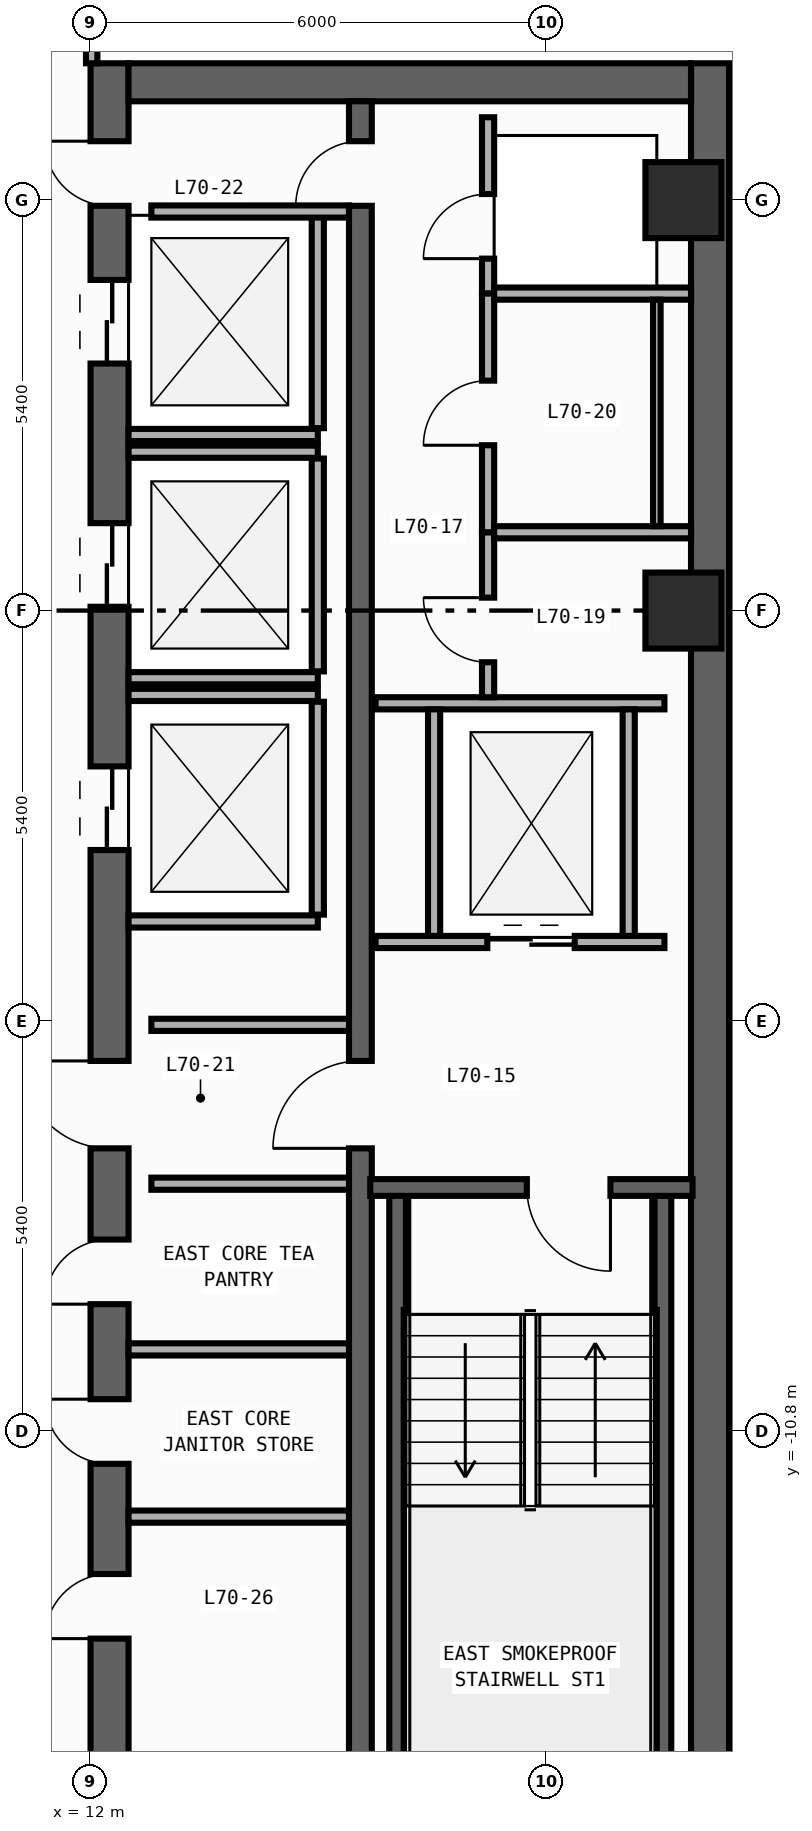
"""IFC4 building model, lengths in metres.
Left out: names, types, materials, properties, quantities, classifications, styles, units other than length and angle.
Written with IfcOpenShell. Run it as: python <this file> out.ifc"""

import sys

from ifc_helpers import new_model, si_unit, direction, frame, frame_2d, origin, origin_2d, place, context, subcontext, project, spatial, rectangle, circle, extrude, element, fill, save


model = new_model("IFC4")
c1 = context("Model", 3, precision=1e-05, world=origin(), true_north=direction((0.0, 1.0)))
c2 = subcontext(c1, "Body", "Model", "MODEL_VIEW")
j1 = project(units=[si_unit("LENGTHUNIT", "METRE"), si_unit("PLANEANGLEUNIT", "RADIAN")], contexts=[c1])
p1 = place(None, origin())
s1 = spatial("IfcSite", under=j1, at=p1, CompositionType="ELEMENT")
p2 = place(p1, origin())
s2 = spatial("IfcBuilding", under=s1, at=p2, CompositionType="ELEMENT")
p3 = place(p2, frame((0.0, 0.0, 292.8)))
s3 = spatial("IfcBuildingStorey", under=s2, at=p3, CompositionType="ELEMENT", Elevation=292.8)
p4 = place(p3, frame((12.25, -19.8, 0.0), z_axis=(0.0, 0.0, 1.0), x_axis=(0.0, 1.0, 0.0)))
e1 = element("IfcWall", 1, at=p4, inside=s3, PredefinedType="SHEAR", context=c2, shape_type="SweptSolid", body=[
    extrude(rectangle(XDim=27.0, YDim=0.5, at=frame_2d((13.5, 0.0))), origin(), (0.0, 0.0, 1.0), 3.54),
])
p5 = place(p4, frame((23.05, 0.0, 0.0)))
e2 = element("IfcOpeningElement", 2, at=p5, cuts=e1, PredefinedType="OPENING", context=c2, shape_type="SweptSolid", body=[
    extrude(rectangle(XDim=1.1, YDim=2.2, at=frame_2d((0.55, 1.1))), frame((0.0, 0.26, 0.0), z_axis=(0.0, -1.0, 0.0), x_axis=(1.0, 0.0, 0.0)), (0.0, 0.0, 1.0), 0.52),
])
p6 = place(p4, frame((19.85, 0.0, 0.0)))
e3 = element("IfcOpeningElement", 3, at=p6, cuts=e1, PredefinedType="OPENING", context=c2, shape_type="SweptSolid", body=[
    extrude(rectangle(XDim=1.1, YDim=2.2, at=frame_2d((0.55, 1.1))), frame((0.0, 0.26, 0.0), z_axis=(0.0, -1.0, 0.0), x_axis=(1.0, 0.0, 0.0)), (0.0, 0.0, 1.0), 0.52),
])
p7 = place(p4, frame((16.65, 0.0, 0.0)))
e4 = element("IfcOpeningElement", 4, at=p7, cuts=e1, PredefinedType="OPENING", context=c2, shape_type="SweptSolid", body=[
    extrude(rectangle(XDim=1.1, YDim=2.2, at=frame_2d((0.55, 1.1))), frame((0.0, 0.26, 0.0), z_axis=(0.0, -1.0, 0.0), x_axis=(1.0, 0.0, 0.0)), (0.0, 0.0, 1.0), 0.52),
])
p8 = place(p4, frame((6.275, 0.0, 0.0)))
e5 = element("IfcOpeningElement", 5, at=p8, cuts=e1, PredefinedType="OPENING", context=c2, shape_type="SweptSolid", body=[
    extrude(rectangle(XDim=0.85, YDim=2.1, at=frame_2d((0.425, 1.05))), frame((0.0, 0.26, 0.0), z_axis=(0.0, -1.0, 0.0), x_axis=(1.0, 0.0, 0.0)), (0.0, 0.0, 1.0), 0.52),
])
p9 = place(p4, frame((8.575, 0.0, 0.0)))
e6 = element("IfcOpeningElement", 6, at=p9, cuts=e1, PredefinedType="OPENING", context=c2, shape_type="SweptSolid", body=[
    extrude(rectangle(XDim=0.85, YDim=2.1, at=frame_2d((0.425, 1.05))), frame((0.0, 0.26, 0.0), z_axis=(0.0, -1.0, 0.0), x_axis=(1.0, 0.0, 0.0)), (0.0, 0.0, 1.0), 0.52),
])
p10 = place(p4, frame((10.675, 0.0, 0.0)))
e7 = element("IfcOpeningElement", 7, at=p10, cuts=e1, PredefinedType="OPENING", context=c2, shape_type="SweptSolid", body=[
    extrude(rectangle(XDim=0.85, YDim=2.1, at=frame_2d((0.425, 1.05))), frame((0.0, 0.26, 0.0), z_axis=(0.0, -1.0, 0.0), x_axis=(1.0, 0.0, 0.0)), (0.0, 0.0, 1.0), 0.52),
])
p11 = place(p4, frame((12.725, 0.0, 0.0)))
e8 = element("IfcOpeningElement", 8, at=p11, cuts=e1, PredefinedType="OPENING", context=c2, shape_type="SweptSolid", body=[
    extrude(rectangle(XDim=1.15, YDim=2.2, at=frame_2d((0.575, 1.1))), frame((0.0, 0.26, 0.0), z_axis=(0.0, -1.0, 0.0), x_axis=(1.0, 0.0, 0.0)), (0.0, 0.0, 1.0), 0.52),
])
p12 = place(p4, frame((25.125, 0.0, 0.0)))
e9 = element("IfcOpeningElement", 9, at=p12, cuts=e1, PredefinedType="OPENING", context=c2, shape_type="SweptSolid", body=[
    extrude(rectangle(XDim=0.85, YDim=2.1, at=frame_2d((0.425, 1.05))), frame((0.0, 0.26, 0.0), z_axis=(0.0, -1.0, 0.0), x_axis=(1.0, 0.0, 0.0)), (0.0, 0.0, 1.0), 0.52),
])
p13 = place(p3, frame((20.15, -19.8, 0.0), z_axis=(0.0, 0.0, 1.0), x_axis=(0.0, 1.0, 0.0)))
e10 = element("IfcWall", 10, at=p13, inside=s3, PredefinedType="SHEAR", context=c2, shape_type="SweptSolid", body=[
    extrude(rectangle(XDim=27.0, YDim=0.5, at=frame_2d((13.5, 0.0))), origin(), (0.0, 0.0, 1.0), 3.54),
])
p14 = place(p3, frame((12.5, 6.95, 0.0), z_axis=(0.0, 0.0, 1.0), x_axis=(1.0, 0.0, 0.0)))
e11 = element("IfcWall", 11, at=p14, inside=s3, PredefinedType="SHEAR", context=c2, shape_type="SweptSolid", body=[
    extrude(rectangle(XDim=7.4, YDim=0.5, at=frame_2d((3.7, 0.0))), origin(), (0.0, 0.0, 1.0), 3.54),
])
p15 = place(p3, frame((15.55, -19.3, 0.0), z_axis=(0.0, 0.0, 1.0), x_axis=(0.0, 1.0, 0.0)))
e12 = element("IfcWall", 12, at=p15, inside=s3, PredefinedType="SHEAR", context=c2, shape_type="SweptSolid", body=[
    extrude(rectangle(XDim=26.0, YDim=0.3, at=frame_2d((13.0, 0.0))), origin(), (0.0, 0.0, 1.0), 3.54),
])
p16 = place(p15, frame((12.225, 0.0, 0.0)))
e13 = element("IfcOpeningElement", 13, at=p16, cuts=e12, PredefinedType="OPENING", context=c2, shape_type="SweptSolid", body=[
    extrude(rectangle(XDim=1.15, YDim=2.2, at=frame_2d((0.575, 1.1))), frame((0.0, 0.16, 0.0), z_axis=(0.0, -1.0, 0.0), x_axis=(1.0, 0.0, 0.0)), (0.0, 0.0, 1.0), 0.32),
])
p17 = place(p15, frame((24.625, 0.0, 0.0)))
e14 = element("IfcOpeningElement", 14, at=p17, cuts=e12, PredefinedType="OPENING", context=c2, shape_type="SweptSolid", body=[
    extrude(rectangle(XDim=0.85, YDim=2.1, at=frame_2d((0.425, 1.05))), frame((0.0, 0.16, 0.0), z_axis=(0.0, -1.0, 0.0), x_axis=(1.0, 0.0, 0.0)), (0.0, 0.0, 1.0), 0.32),
])
for number, where, z_axis, x_axis in (
    (15, (16.04, -19.01, 0.0), (0.0, 0.0, 1.0), (0.0, 1.0, 0.0)),
    (16, (19.53, -19.01, 0.0), (0.0, 0.0, 1.0), (0.0, 1.0, 0.0)),
):
    element("IfcWall", number, at=place(p3, frame(where, z_axis=z_axis, x_axis=x_axis)), inside=s3, PredefinedType="SHEAR", context=c2, shape_type="SweptSolid", body=[
        extrude(rectangle(XDim=11.42, YDim=0.22, at=frame_2d((5.71, 0.0))), origin(), (0.0, 0.0, 1.0), 3.54),
    ])
p18 = place(p3, frame((19.92, -7.59, 0.0), z_axis=(0.0, 0.0, 1.0), x_axis=(-1.0, 0.0, 0.0)))
e17 = element("IfcWall", 17, at=p18, inside=s3, PredefinedType="SHEAR", context=c2, shape_type="SweptSolid", body=[
    extrude(rectangle(XDim=4.24, YDim=0.22, at=frame_2d((2.12, 0.0))), origin(), (0.0, 0.0, 1.0), 3.54),
])
p19 = place(p18, frame((1.08, 0.0, 0.0)))
e18 = element("IfcOpeningElement", 18, at=p19, cuts=e17, PredefinedType="OPENING", context=c2, shape_type="SweptSolid", body=[
    extrude(rectangle(XDim=1.1, YDim=2.2, at=frame_2d((0.55, 1.1))), frame((0.0, 0.12, 0.0), z_axis=(0.0, -1.0, 0.0), x_axis=(1.0, 0.0, 0.0)), (0.0, 0.0, 1.0), 0.24),
])
for number, where, z_axis, x_axis in (
    (19, (19.8, 0.0, 0.0), (0.0, 0.0, 1.0), (1.0, 0.0, 0.0)),
    (20, (19.8, 5.4, 0.0), (0.0, 0.0, 1.0), (1.0, 0.0, 0.0)),
):
    element("IfcColumn", number, at=place(p3, frame(where, z_axis=z_axis, x_axis=x_axis)), inside=s3, PredefinedType="COLUMN", context=c2, shape_type="SweptSolid", body=[
        extrude(circle(Radius=0.5, at=origin_2d()), origin(), (0.0, 0.0, 1.0), 3.8),
    ])
p20 = place(p3, frame((12.5, 2.31, 0.0), z_axis=(0.0, 0.0, 1.0), x_axis=(1.0, 0.0, 0.0)))
e21 = element("IfcWall", 21, at=p20, inside=s3, PredefinedType="STANDARD", context=c2, shape_type="SweptSolid", body=[
    extrude(rectangle(XDim=2.49, YDim=0.16, at=frame_2d((1.245, 0.0))), origin(), (0.0, 0.0, 1.0), 3.54),
])
p21 = place(p3, frame((14.99, 2.4, 0.0), z_axis=(0.0, 0.0, 1.0), x_axis=(0.0, 1.0, 0.0)))
e22 = element("IfcWall", 22, at=p21, inside=s3, PredefinedType="STANDARD", context=c2, shape_type="SweptSolid", body=[
    extrude(rectangle(XDim=2.8, YDim=0.16, at=frame_2d((1.4, 0.0))), origin(), (0.0, 0.0, 1.0), 3.54),
])
for number, where, z_axis, x_axis in (
    (23, (12.5, -0.89, 0.0), (0.0, 0.0, 1.0), (1.0, 0.0, 0.0)),
    (24, (12.5, 2.09, 0.0), (0.0, 0.0, 1.0), (1.0, 0.0, 0.0)),
):
    element("IfcWall", number, at=place(p3, frame(where, z_axis=z_axis, x_axis=x_axis)), inside=s3, PredefinedType="STANDARD", context=c2, shape_type="SweptSolid", body=[
        extrude(rectangle(XDim=2.49, YDim=0.16, at=frame_2d((1.245, 0.0))), origin(), (0.0, 0.0, 1.0), 3.54),
    ])
p22 = place(p3, frame((14.99, -0.8, 0.0), z_axis=(0.0, 0.0, 1.0), x_axis=(0.0, 1.0, 0.0)))
e25 = element("IfcWall", 25, at=p22, inside=s3, PredefinedType="STANDARD", context=c2, shape_type="SweptSolid", body=[
    extrude(rectangle(XDim=2.8, YDim=0.16, at=frame_2d((1.4, 0.0))), origin(), (0.0, 0.0, 1.0), 3.54),
])
for number, where, z_axis, x_axis in (
    (26, (12.5, -4.09, 0.0), (0.0, 0.0, 1.0), (1.0, 0.0, 0.0)),
    (27, (12.5, -1.11, 0.0), (0.0, 0.0, 1.0), (1.0, 0.0, 0.0)),
):
    element("IfcWall", number, at=place(p3, frame(where, z_axis=z_axis, x_axis=x_axis)), inside=s3, PredefinedType="STANDARD", context=c2, shape_type="SweptSolid", body=[
        extrude(rectangle(XDim=2.49, YDim=0.16, at=frame_2d((1.245, 0.0))), origin(), (0.0, 0.0, 1.0), 3.54),
    ])
p23 = place(p3, frame((14.99, -4.0, 0.0), z_axis=(0.0, 0.0, 1.0), x_axis=(0.0, 1.0, 0.0)))
e28 = element("IfcWall", 28, at=p23, inside=s3, PredefinedType="STANDARD", context=c2, shape_type="SweptSolid", body=[
    extrude(rectangle(XDim=2.8, YDim=0.16, at=frame_2d((1.4, 0.0))), origin(), (0.0, 0.0, 1.0), 3.54),
])
p24 = place(p3, frame((15.75, -4.36, 0.0), z_axis=(0.0, 0.0, 1.0), x_axis=(1.0, 0.0, 0.0)))
e29 = element("IfcWall", 29, at=p24, inside=s3, PredefinedType="STANDARD", context=c2, shape_type="SweptSolid", body=[
    extrude(rectangle(XDim=3.8, YDim=0.16, at=frame_2d((1.9, 0.0))), origin(), (0.0, 0.0, 1.0), 3.54),
])
p25 = place(p24, frame((1.47, 0.0, 0.0)))
e30 = element("IfcOpeningElement", 30, at=p25, cuts=e29, PredefinedType="OPENING", context=c2, shape_type="SweptSolid", body=[
    extrude(rectangle(XDim=1.15, YDim=2.2, at=frame_2d((0.575, 1.1))), frame((0.0, 0.09, 0.0), z_axis=(0.0, -1.0, 0.0), x_axis=(1.0, 0.0, 0.0)), (0.0, 0.0, 1.0), 0.18),
])
p26 = place(p3, frame((15.75, -1.22, 0.0), z_axis=(0.0, 0.0, 1.0), x_axis=(1.0, 0.0, 0.0)))
e31 = element("IfcWall", 31, at=p26, inside=s3, PredefinedType="STANDARD", context=c2, shape_type="SweptSolid", body=[
    extrude(rectangle(XDim=3.8, YDim=0.16, at=frame_2d((1.9, 0.0))), origin(), (0.0, 0.0, 1.0), 3.54),
])
for number, where, z_axis, x_axis in (
    (32, (16.52, -4.28, 0.0), (0.0, 0.0, 1.0), (0.0, 1.0, 0.0)),
    (33, (19.08, -4.28, 0.0), (0.0, 0.0, 1.0), (0.0, 1.0, 0.0)),
):
    element("IfcWall", number, at=place(p3, frame(where, z_axis=z_axis, x_axis=x_axis)), inside=s3, PredefinedType="STANDARD", context=c2, shape_type="SweptSolid", body=[
        extrude(rectangle(XDim=2.98, YDim=0.16, at=frame_2d((1.49, 0.0))), origin(), (0.0, 0.0, 1.0), 3.54),
    ])
for number, where, z_axis, x_axis in (
    (34, (12.8, -5.45, 0.0), (0.0, 0.0, 1.0), (1.0, 0.0, 0.0)),
    (35, (12.8, -7.54, 0.0), (0.0, 0.0, 1.0), (1.0, 0.0, 0.0)),
    (36, (12.8, 5.25, 0.0), (0.0, 0.0, 1.0), (1.0, 0.0, 0.0)),
):
    element("IfcWall", number, at=place(p3, frame(where, z_axis=z_axis, x_axis=x_axis)), inside=s3, PredefinedType="STANDARD", context=c2, shape_type="SweptSolid", body=[
        extrude(rectangle(XDim=2.6, YDim=0.16, at=frame_2d((1.3, 0.0))), origin(), (0.0, 0.0, 1.0), 3.54),
    ])
p27 = place(p3, frame((17.23, 4.17, 0.0), z_axis=(0.0, 0.0, 1.0), x_axis=(0.0, 1.0, 0.0)))
e37 = element("IfcWall", 37, at=p27, inside=s3, PredefinedType="PARTITIONING", context=c2, shape_type="SweptSolid", body=[
    extrude(rectangle(XDim=2.32, YDim=0.16, at=frame_2d((1.16, 0.0))), origin(), (0.0, 0.0, 1.0), 3.54),
])
p28 = place(p27, frame((0.46, 0.0, 0.0)))
e38 = element("IfcOpeningElement", 38, at=p28, cuts=e37, PredefinedType="OPENING", context=c2, shape_type="SweptSolid", body=[
    extrude(rectangle(XDim=0.85, YDim=2.1, at=frame_2d((0.425, 1.05))), frame((0.0, 0.09, 0.0), z_axis=(0.0, -1.0, 0.0), x_axis=(1.0, 0.0, 0.0)), (0.0, 0.0, 1.0), 0.18),
])
p29 = place(p3, frame((17.23, -1.14, 0.0), z_axis=(0.0, 0.0, 1.0), x_axis=(0.0, 1.0, 0.0)))
e39 = element("IfcWall", 39, at=p29, inside=s3, PredefinedType="PARTITIONING", context=c2, shape_type="SweptSolid", body=[
    extrude(rectangle(XDim=2.17, YDim=0.16, at=frame_2d((1.085, 0.0))), origin(), (0.0, 0.0, 1.0), 3.54),
])
p30 = place(p29, frame((0.46, 0.0, 0.0)))
e40 = element("IfcOpeningElement", 40, at=p30, cuts=e39, PredefinedType="OPENING", context=c2, shape_type="SweptSolid", body=[
    extrude(rectangle(XDim=0.85, YDim=2.1, at=frame_2d((0.425, 1.05))), frame((0.0, 0.09, 0.0), z_axis=(0.0, -1.0, 0.0), x_axis=(1.0, 0.0, 0.0)), (0.0, 0.0, 1.0), 0.18),
])
p31 = place(p3, frame((17.23, 1.03, 0.0), z_axis=(0.0, 0.0, 1.0), x_axis=(0.0, 1.0, 0.0)))
e41 = element("IfcWall", 41, at=p31, inside=s3, PredefinedType="PARTITIONING", context=c2, shape_type="SweptSolid", body=[
    extrude(rectangle(XDim=3.14, YDim=0.16, at=frame_2d((1.57, 0.0))), origin(), (0.0, 0.0, 1.0), 3.54),
])
p32 = place(p31, frame((1.145, 0.0, 0.0)))
e42 = element("IfcOpeningElement", 42, at=p32, cuts=e41, PredefinedType="OPENING", context=c2, shape_type="SweptSolid", body=[
    extrude(rectangle(XDim=0.85, YDim=2.1, at=frame_2d((0.425, 1.05))), frame((0.0, 0.09, 0.0), z_axis=(0.0, -1.0, 0.0), x_axis=(1.0, 0.0, 0.0)), (0.0, 0.0, 1.0), 0.18),
])
for number, where, z_axis, x_axis in (
    (43, (17.31, 4.17, 0.0), (0.0, 0.0, 1.0), (1.0, 0.0, 0.0)),
    (44, (17.31, 1.03, 0.0), (0.0, 0.0, 1.0), (1.0, 0.0, 0.0)),
):
    element("IfcWall", number, at=place(p3, frame(where, z_axis=z_axis, x_axis=x_axis)), inside=s3, PredefinedType="PARTITIONING", context=c2, shape_type="SweptSolid", body=[
        extrude(rectangle(XDim=2.59, YDim=0.16, at=frame_2d((1.295, 0.0))), origin(), (0.0, 0.0, 1.0), 3.54),
    ])
for number, where, z_axis, x_axis in (
    (45, (12.5, -11.92, 0.0), (0.0, 0.0, 1.0), (1.0, 0.0, 0.0)),
    (46, (12.5, -9.72, 0.0), (0.0, 0.0, 1.0), (1.0, 0.0, 0.0)),
):
    element("IfcWall", number, at=place(p3, frame(where, z_axis=z_axis, x_axis=x_axis)), inside=s3, PredefinedType="PARTITIONING", context=c2, shape_type="SweptSolid", body=[
        extrude(rectangle(XDim=2.9, YDim=0.16, at=frame_2d((1.45, 0.0))), origin(), (0.0, 0.0, 1.0), 3.54),
    ])
p33 = place(p3, frame((12.015, 7.2, 0.0), z_axis=(0.0, 0.0, 1.0), x_axis=(0.0, 1.0, 0.0)))
e47 = element("IfcWall", 47, at=p33, inside=s3, PredefinedType="PARTITIONING", context=c2, shape_type="SweptSolid", body=[
    extrude(rectangle(XDim=6.68, YDim=0.15, at=frame_2d((3.34, 0.0))), origin(), (0.0, 0.0, 1.0), 3.54),
])
p34 = place(p33, frame((0.67, 0.0, 0.0)))
e48 = element("IfcOpeningElement", 48, at=p34, cuts=e47, PredefinedType="OPENING", context=c2, shape_type="SweptSolid", body=[
    extrude(rectangle(XDim=0.9, YDim=2.15, at=frame_2d((0.45, 1.075))), frame((0.0, 0.085, 0.0), z_axis=(0.0, -1.0, 0.0), x_axis=(1.0, 0.0, 0.0)), (0.0, 0.0, 1.0), 0.17),
])
p35 = place(p3, frame((19.45, 4.09, 0.0), z_axis=(0.0, 0.0, 1.0), x_axis=(0.0, -1.0, 0.0)))
e49 = element("IfcWall", 49, at=p35, inside=s3, PredefinedType="PARTITIONING", context=c2, shape_type="SweptSolid", body=[
    extrude(rectangle(XDim=2.98, YDim=0.1, at=frame_2d((1.49, 0.0))), origin(), (0.0, 0.0, 1.0), 3.54),
])
p36 = place(p19, origin())
e50 = element("IfcDoor", 50, at=p36, inside=s3, OperationType="SINGLE_SWING_LEFT", PredefinedType="DOOR", context=c2, shape_type="SweptSolid", body=[
    extrude(rectangle(XDim=1.1, YDim=2.2, at=frame_2d((0.55, 1.1))), frame((0.0, 0.025, 0.0), z_axis=(0.0, -1.0, 0.0), x_axis=(1.0, 0.0, 0.0)), (0.0, 0.0, 1.0), 0.05),
])
fill(e18, e50)
p37 = place(p5, origin())
e51 = element("IfcDoor", 51, at=p37, inside=s3, OperationType="DOUBLE_DOOR_SLIDING", PredefinedType="DOOR", context=c2, shape_type="SweptSolid", body=[
    extrude(rectangle(XDim=1.1, YDim=2.2, at=frame_2d((0.55, 1.1))), frame((0.0, 0.025, 0.0), z_axis=(0.0, -1.0, 0.0), x_axis=(1.0, 0.0, 0.0)), (0.0, 0.0, 1.0), 0.05),
])
fill(e2, e51)
p38 = place(p6, origin())
e52 = element("IfcDoor", 52, at=p38, inside=s3, OperationType="DOUBLE_DOOR_SLIDING", PredefinedType="DOOR", context=c2, shape_type="SweptSolid", body=[
    extrude(rectangle(XDim=1.1, YDim=2.2, at=frame_2d((0.55, 1.1))), frame((0.0, 0.025, 0.0), z_axis=(0.0, -1.0, 0.0), x_axis=(1.0, 0.0, 0.0)), (0.0, 0.0, 1.0), 0.05),
])
fill(e3, e52)
p39 = place(p7, origin())
e53 = element("IfcDoor", 53, at=p39, inside=s3, OperationType="DOUBLE_DOOR_SLIDING", PredefinedType="DOOR", context=c2, shape_type="SweptSolid", body=[
    extrude(rectangle(XDim=1.1, YDim=2.2, at=frame_2d((0.55, 1.1))), frame((0.0, 0.025, 0.0), z_axis=(0.0, -1.0, 0.0), x_axis=(1.0, 0.0, 0.0)), (0.0, 0.0, 1.0), 0.05),
])
fill(e4, e53)
p40 = place(p8, origin())
e54 = element("IfcDoor", 54, at=p40, inside=s3, OperationType="SINGLE_SWING_LEFT", PredefinedType="DOOR", context=c2, shape_type="SweptSolid", body=[
    extrude(rectangle(XDim=0.85, YDim=2.1, at=frame_2d((0.425, 1.05))), frame((0.0, 0.025, 0.0), z_axis=(0.0, -1.0, 0.0), x_axis=(1.0, 0.0, 0.0)), (0.0, 0.0, 1.0), 0.05),
])
fill(e5, e54)
p41 = place(p9, origin())
e55 = element("IfcDoor", 55, at=p41, inside=s3, OperationType="SINGLE_SWING_RIGHT", PredefinedType="DOOR", context=c2, shape_type="SweptSolid", body=[
    extrude(rectangle(XDim=0.85, YDim=2.1, at=frame_2d((0.425, 1.05))), frame((0.0, 0.025, 0.0), z_axis=(0.0, -1.0, 0.0), x_axis=(1.0, 0.0, 0.0)), (0.0, 0.0, 1.0), 0.05),
])
fill(e6, e55)
p42 = place(p10, origin())
e56 = element("IfcDoor", 56, at=p42, inside=s3, OperationType="SINGLE_SWING_LEFT", PredefinedType="DOOR", context=c2, shape_type="SweptSolid", body=[
    extrude(rectangle(XDim=0.85, YDim=2.1, at=frame_2d((0.425, 1.05))), frame((0.0, 0.025, 0.0), z_axis=(0.0, -1.0, 0.0), x_axis=(1.0, 0.0, 0.0)), (0.0, 0.0, 1.0), 0.05),
])
fill(e7, e56)
p43 = place(p11, origin())
e57 = element("IfcDoor", 57, at=p43, inside=s3, OperationType="SINGLE_SWING_RIGHT", PredefinedType="DOOR", context=c2, shape_type="SweptSolid", body=[
    extrude(rectangle(XDim=1.15, YDim=2.2, at=frame_2d((0.575, 1.1))), frame((0.0, 0.025, 0.0), z_axis=(0.0, -1.0, 0.0), x_axis=(1.0, 0.0, 0.0)), (0.0, 0.0, 1.0), 0.05),
])
fill(e8, e57)
p44 = place(p16, origin())
e58 = element("IfcDoor", 58, at=p44, inside=s3, OperationType="SINGLE_SWING_LEFT", PredefinedType="DOOR", context=c2, shape_type="SweptSolid", body=[
    extrude(rectangle(XDim=1.15, YDim=2.2, at=frame_2d((0.575, 1.1))), frame((0.0, 0.025, 0.0), z_axis=(0.0, -1.0, 0.0), x_axis=(1.0, 0.0, 0.0)), (0.0, 0.0, 1.0), 0.05),
])
fill(e13, e58)
p45 = place(p12, origin())
e59 = element("IfcDoor", 59, at=p45, inside=s3, OperationType="SINGLE_SWING_RIGHT", PredefinedType="DOOR", context=c2, shape_type="SweptSolid", body=[
    extrude(rectangle(XDim=0.85, YDim=2.1, at=frame_2d((0.425, 1.05))), frame((0.0, 0.025, 0.0), z_axis=(0.0, -1.0, 0.0), x_axis=(1.0, 0.0, 0.0)), (0.0, 0.0, 1.0), 0.05),
])
fill(e9, e59)
p46 = place(p17, origin())
e60 = element("IfcDoor", 60, at=p46, inside=s3, OperationType="SINGLE_SWING_LEFT", PredefinedType="DOOR", context=c2, shape_type="SweptSolid", body=[
    extrude(rectangle(XDim=0.85, YDim=2.1, at=frame_2d((0.425, 1.05))), frame((0.0, 0.025, 0.0), z_axis=(0.0, -1.0, 0.0), x_axis=(1.0, 0.0, 0.0)), (0.0, 0.0, 1.0), 0.05),
])
fill(e14, e60)
p47 = place(p25, origin())
e61 = element("IfcDoor", 61, at=p47, inside=s3, OperationType="DOUBLE_DOOR_SLIDING", PredefinedType="DOOR", context=c2, shape_type="SweptSolid", body=[
    extrude(rectangle(XDim=1.15, YDim=2.2, at=frame_2d((0.575, 1.1))), frame((0.0, 0.025, 0.0), z_axis=(0.0, -1.0, 0.0), x_axis=(1.0, 0.0, 0.0)), (0.0, 0.0, 1.0), 0.05),
])
fill(e30, e61)
p48 = place(p28, origin())
e62 = element("IfcDoor", 62, at=p48, inside=s3, OperationType="SINGLE_SWING_LEFT", PredefinedType="DOOR", context=c2, shape_type="SweptSolid", body=[
    extrude(rectangle(XDim=0.85, YDim=2.1, at=frame_2d((0.425, 1.05))), frame((0.0, 0.025, 0.0), z_axis=(0.0, -1.0, 0.0), x_axis=(1.0, 0.0, 0.0)), (0.0, 0.0, 1.0), 0.05),
])
fill(e38, e62)
p49 = place(p30, origin())
e63 = element("IfcDoor", 63, at=p49, inside=s3, OperationType="SINGLE_SWING_RIGHT", PredefinedType="DOOR", context=c2, shape_type="SweptSolid", body=[
    extrude(rectangle(XDim=0.85, YDim=2.1, at=frame_2d((0.425, 1.05))), frame((0.0, 0.025, 0.0), z_axis=(0.0, -1.0, 0.0), x_axis=(1.0, 0.0, 0.0)), (0.0, 0.0, 1.0), 0.05),
])
fill(e40, e63)
p50 = place(p32, origin())
e64 = element("IfcDoor", 64, at=p50, inside=s3, OperationType="SINGLE_SWING_LEFT", PredefinedType="DOOR", context=c2, shape_type="SweptSolid", body=[
    extrude(rectangle(XDim=0.85, YDim=2.1, at=frame_2d((0.425, 1.05))), frame((0.0, 0.025, 0.0), z_axis=(0.0, -1.0, 0.0), x_axis=(1.0, 0.0, 0.0)), (0.0, 0.0, 1.0), 0.05),
])
fill(e42, e64)
save(model, sys.argv[1])
